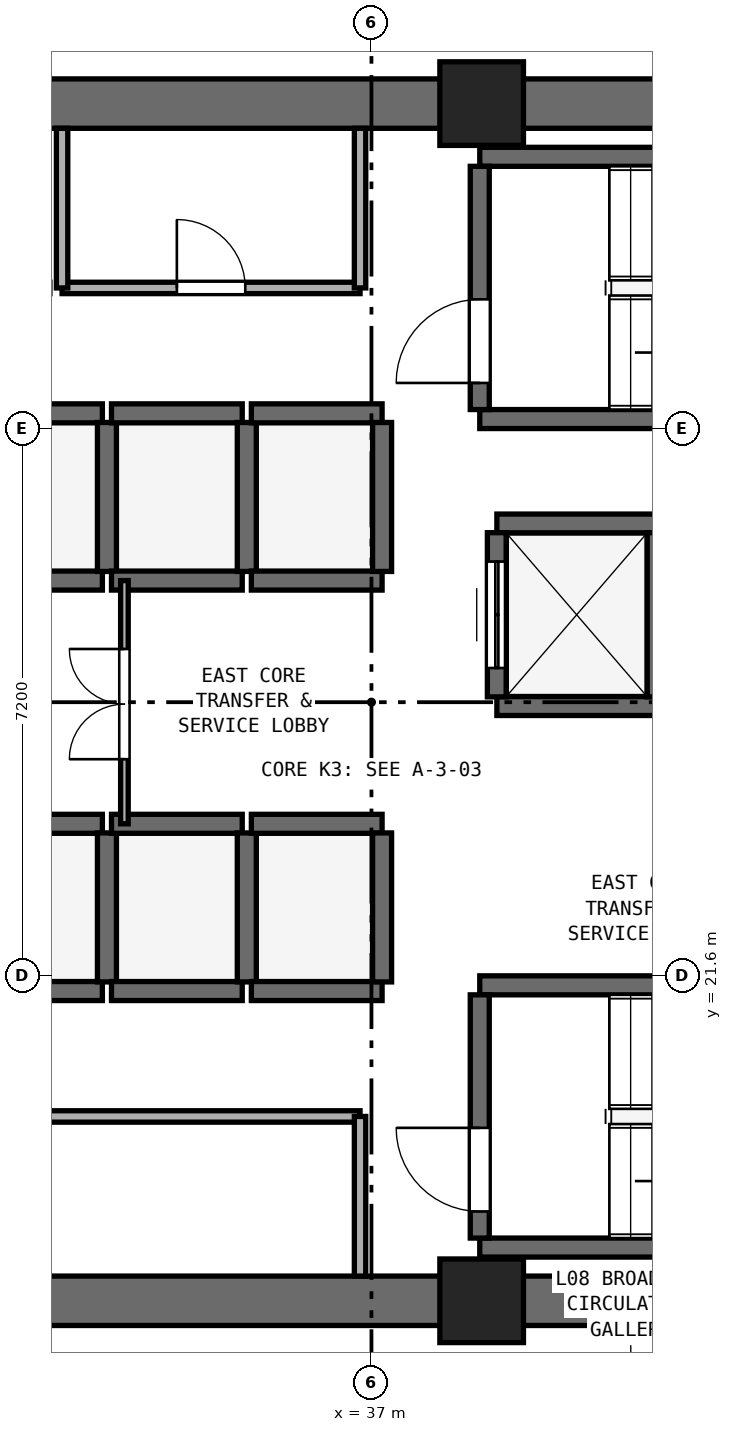
"""IFC4 building model, lengths in metres.
Left out: names, types, materials, properties, quantities, classifications, styles, units other than length and angle.
Written with IfcOpenShell. Run it as: python <this file> out.ifc"""

import sys

from ifc_helpers import new_model, si_unit, direction, frame, frame_2d, origin, origin_2d, place, context, subcontext, project, spatial, rectangle, extrude, element, fill, save


model = new_model("IFC4")
c1 = context("Model", 3, precision=1e-05, world=origin(), true_north=direction((0.0, 1.0)))
c2 = subcontext(c1, "Body", "Model", "MODEL_VIEW")
j1 = project(units=[si_unit("LENGTHUNIT", "METRE"), si_unit("PLANEANGLEUNIT", "RADIAN")], contexts=[c1])
p1 = place(None, origin())
s1 = spatial("IfcSite", under=j1, at=p1, CompositionType="ELEMENT")
p2 = place(p1, origin())
s2 = spatial("IfcBuilding", under=s1, at=p2, CompositionType="ELEMENT")
p3 = place(p2, frame((0.0, 0.0, 36.4)))
s3 = spatial("IfcBuildingStorey", under=s2, at=p3, CompositionType="ELEMENT", Elevation=36.4)
for number, where, z_axis, x_axis in (
    (1, (25.4, 17.325, 0.0), (0.0, 0.0, 1.0), (1.0, 0.0, 0.0)),
    (2, (25.4, 33.075, 0.0), (0.0, 0.0, 1.0), (1.0, 0.0, 0.0)),
):
    element("IfcWall", number, at=place(p3, frame(where, z_axis=z_axis, x_axis=x_axis)), inside=s3, PredefinedType="SHEAR", context=c2, shape_type="SweptSolid", body=[
        extrude(rectangle(XDim=23.2, YDim=0.65, at=frame_2d((11.6, 0.0))), origin(), (0.0, 0.0, 1.0), 3.525),
    ])
for number, where, z_axis, x_axis in (
    (3, (38.45, 17.325, 0.0), (0.0, 0.0, 1.0), (1.0, 0.0, 0.0)),
    (4, (38.45, 33.075, 0.0), (0.0, 0.0, 1.0), (1.0, 0.0, 0.0)),
):
    element("IfcColumn", number, at=place(p3, frame(where, z_axis=z_axis, x_axis=x_axis)), inside=s3, PredefinedType="PILASTER", context=c2, shape_type="SweptSolid", body=[
        extrude(rectangle(XDim=1.1, YDim=1.1, at=origin_2d()), origin(), (0.0, 0.0, 1.0), 3.8),
    ])
for number, where, z_axis, x_axis in (
    (5, (38.425, 28.925, 0.0), (0.0, 0.0, 1.0), (1.0, 0.0, 0.0)),
    (6, (38.425, 32.375, 0.0), (0.0, 0.0, 1.0), (1.0, 0.0, 0.0)),
):
    element("IfcWall", number, at=place(p3, frame(where, z_axis=z_axis, x_axis=x_axis)), inside=s3, PredefinedType="SHEAR", context=c2, shape_type="SweptSolid", body=[
        extrude(rectangle(XDim=7.3, YDim=0.25, at=frame_2d((3.65, 0.0))), origin(), (0.0, 0.0, 1.0), 3.525),
    ])
p4 = place(p3, frame((38.425, 29.05, 0.0), z_axis=(0.0, 0.0, 1.0), x_axis=(0.0, 1.0, 0.0)))
e7 = element("IfcWall", 7, at=p4, inside=s3, PredefinedType="SHEAR", context=c2, shape_type="SweptSolid", body=[
    extrude(rectangle(XDim=3.2, YDim=0.25, at=frame_2d((1.6, 0.0))), origin(), (0.0, 0.0, 1.0), 3.525),
])
p5 = place(p4, frame((0.35, 0.0, 0.0)))
e8 = element("IfcOpeningElement", 8, at=p5, cuts=e7, PredefinedType="OPENING", context=c2, shape_type="SweptSolid", body=[
    extrude(rectangle(XDim=1.1, YDim=2.15, at=frame_2d((0.55, 1.075))), frame((0.0, 0.135, 0.0), z_axis=(0.0, -1.0, 0.0), x_axis=(1.0, 0.0, 0.0)), (0.0, 0.0, 1.0), 0.27),
])
for number, where, z_axis, x_axis in (
    (9, (38.425, 18.025, 0.0), (0.0, 0.0, 1.0), (1.0, 0.0, 0.0)),
    (10, (38.425, 21.475, 0.0), (0.0, 0.0, 1.0), (1.0, 0.0, 0.0)),
):
    element("IfcWall", number, at=place(p3, frame(where, z_axis=z_axis, x_axis=x_axis)), inside=s3, PredefinedType="SHEAR", context=c2, shape_type="SweptSolid", body=[
        extrude(rectangle(XDim=7.3, YDim=0.25, at=frame_2d((3.65, 0.0))), origin(), (0.0, 0.0, 1.0), 3.525),
    ])
p6 = place(p3, frame((38.425, 18.15, 0.0), z_axis=(0.0, 0.0, 1.0), x_axis=(0.0, 1.0, 0.0)))
e11 = element("IfcWall", 11, at=p6, inside=s3, PredefinedType="SHEAR", context=c2, shape_type="SweptSolid", body=[
    extrude(rectangle(XDim=3.2, YDim=0.25, at=frame_2d((1.6, 0.0))), origin(), (0.0, 0.0, 1.0), 3.525),
])
p7 = place(p6, frame((0.35, 0.0, 0.0)))
e12 = element("IfcOpeningElement", 12, at=p7, cuts=e11, PredefinedType="OPENING", context=c2, shape_type="SweptSolid", body=[
    extrude(rectangle(XDim=1.1, YDim=2.15, at=frame_2d((0.55, 1.075))), frame((0.0, 0.135, 0.0), z_axis=(0.0, -1.0, 0.0), x_axis=(1.0, 0.0, 0.0)), (0.0, 0.0, 1.0), 0.27),
])
for number, where, z_axis, x_axis in (
    (13, (31.74, 21.4, 0.0), (0.0, 0.0, 1.0), (1.0, 0.0, 0.0)),
    (14, (31.74, 23.6, 0.0), (0.0, 0.0, 1.0), (1.0, 0.0, 0.0)),
):
    element("IfcWall", number, at=place(p3, frame(where, z_axis=z_axis, x_axis=x_axis)), inside=s3, PredefinedType="SHEAR", context=c2, shape_type="SweptSolid", body=[
        extrude(rectangle(XDim=1.72, YDim=0.25, at=frame_2d((0.86, 0.0))), origin(), (0.0, 0.0, 1.0), 3.525),
    ])
p8 = place(p3, frame((33.52, 21.52, 0.0), z_axis=(0.0, 0.0, 1.0), x_axis=(0.0, 1.0, 0.0)))
e15 = element("IfcWall", 15, at=p8, inside=s3, PredefinedType="SHEAR", context=c2, shape_type="SweptSolid", body=[
    extrude(rectangle(XDim=1.96, YDim=0.25, at=frame_2d((0.98, 0.0))), origin(), (0.0, 0.0, 1.0), 3.525),
])
for number, where, z_axis, x_axis in (
    (16, (33.58, 21.4, 0.0), (0.0, 0.0, 1.0), (1.0, 0.0, 0.0)),
    (17, (33.58, 23.6, 0.0), (0.0, 0.0, 1.0), (1.0, 0.0, 0.0)),
):
    element("IfcWall", number, at=place(p3, frame(where, z_axis=z_axis, x_axis=x_axis)), inside=s3, PredefinedType="SHEAR", context=c2, shape_type="SweptSolid", body=[
        extrude(rectangle(XDim=1.72, YDim=0.25, at=frame_2d((0.86, 0.0))), origin(), (0.0, 0.0, 1.0), 3.525),
    ])
p9 = place(p3, frame((35.36, 21.52, 0.0), z_axis=(0.0, 0.0, 1.0), x_axis=(0.0, 1.0, 0.0)))
e18 = element("IfcWall", 18, at=p9, inside=s3, PredefinedType="SHEAR", context=c2, shape_type="SweptSolid", body=[
    extrude(rectangle(XDim=1.96, YDim=0.25, at=frame_2d((0.98, 0.0))), origin(), (0.0, 0.0, 1.0), 3.525),
])
for number, where, z_axis, x_axis in (
    (19, (35.42, 21.4, 0.0), (0.0, 0.0, 1.0), (1.0, 0.0, 0.0)),
    (20, (35.42, 23.6, 0.0), (0.0, 0.0, 1.0), (1.0, 0.0, 0.0)),
):
    element("IfcWall", number, at=place(p3, frame(where, z_axis=z_axis, x_axis=x_axis)), inside=s3, PredefinedType="SHEAR", context=c2, shape_type="SweptSolid", body=[
        extrude(rectangle(XDim=1.72, YDim=0.25, at=frame_2d((0.86, 0.0))), origin(), (0.0, 0.0, 1.0), 3.525),
    ])
p10 = place(p3, frame((37.14, 21.52, 0.0), z_axis=(0.0, 0.0, 1.0), x_axis=(0.0, 1.0, 0.0)))
e21 = element("IfcWall", 21, at=p10, inside=s3, PredefinedType="SHEAR", context=c2, shape_type="SweptSolid", body=[
    extrude(rectangle(XDim=1.96, YDim=0.25, at=frame_2d((0.98, 0.0))), origin(), (0.0, 0.0, 1.0), 3.525),
])
for number, where, z_axis, x_axis in (
    (22, (31.74, 26.8, 0.0), (0.0, 0.0, 1.0), (1.0, 0.0, 0.0)),
    (23, (31.74, 29.0, 0.0), (0.0, 0.0, 1.0), (1.0, 0.0, 0.0)),
):
    element("IfcWall", number, at=place(p3, frame(where, z_axis=z_axis, x_axis=x_axis)), inside=s3, PredefinedType="SHEAR", context=c2, shape_type="SweptSolid", body=[
        extrude(rectangle(XDim=1.72, YDim=0.25, at=frame_2d((0.86, 0.0))), origin(), (0.0, 0.0, 1.0), 3.525),
    ])
p11 = place(p3, frame((33.52, 26.92, 0.0), z_axis=(0.0, 0.0, 1.0), x_axis=(0.0, 1.0, 0.0)))
e24 = element("IfcWall", 24, at=p11, inside=s3, PredefinedType="SHEAR", context=c2, shape_type="SweptSolid", body=[
    extrude(rectangle(XDim=1.96, YDim=0.25, at=frame_2d((0.98, 0.0))), origin(), (0.0, 0.0, 1.0), 3.525),
])
for number, where, z_axis, x_axis in (
    (25, (33.58, 26.8, 0.0), (0.0, 0.0, 1.0), (1.0, 0.0, 0.0)),
    (26, (33.58, 29.0, 0.0), (0.0, 0.0, 1.0), (1.0, 0.0, 0.0)),
):
    element("IfcWall", number, at=place(p3, frame(where, z_axis=z_axis, x_axis=x_axis)), inside=s3, PredefinedType="SHEAR", context=c2, shape_type="SweptSolid", body=[
        extrude(rectangle(XDim=1.72, YDim=0.25, at=frame_2d((0.86, 0.0))), origin(), (0.0, 0.0, 1.0), 3.525),
    ])
p12 = place(p3, frame((35.36, 26.92, 0.0), z_axis=(0.0, 0.0, 1.0), x_axis=(0.0, 1.0, 0.0)))
e27 = element("IfcWall", 27, at=p12, inside=s3, PredefinedType="SHEAR", context=c2, shape_type="SweptSolid", body=[
    extrude(rectangle(XDim=1.96, YDim=0.25, at=frame_2d((0.98, 0.0))), origin(), (0.0, 0.0, 1.0), 3.525),
])
for number, where, z_axis, x_axis in (
    (28, (35.42, 26.8, 0.0), (0.0, 0.0, 1.0), (1.0, 0.0, 0.0)),
    (29, (35.42, 29.0, 0.0), (0.0, 0.0, 1.0), (1.0, 0.0, 0.0)),
):
    element("IfcWall", number, at=place(p3, frame(where, z_axis=z_axis, x_axis=x_axis)), inside=s3, PredefinedType="SHEAR", context=c2, shape_type="SweptSolid", body=[
        extrude(rectangle(XDim=1.72, YDim=0.25, at=frame_2d((0.86, 0.0))), origin(), (0.0, 0.0, 1.0), 3.525),
    ])
p13 = place(p3, frame((37.14, 26.92, 0.0), z_axis=(0.0, 0.0, 1.0), x_axis=(0.0, 1.0, 0.0)))
e30 = element("IfcWall", 30, at=p13, inside=s3, PredefinedType="SHEAR", context=c2, shape_type="SweptSolid", body=[
    extrude(rectangle(XDim=1.96, YDim=0.25, at=frame_2d((0.98, 0.0))), origin(), (0.0, 0.0, 1.0), 3.525),
])
for number, where, z_axis, x_axis in (
    (31, (38.65, 25.15, 0.0), (0.0, 0.0, 1.0), (1.0, 0.0, 0.0)),
    (32, (38.65, 27.55, 0.0), (0.0, 0.0, 1.0), (1.0, 0.0, 0.0)),
):
    element("IfcWall", number, at=place(p3, frame(where, z_axis=z_axis, x_axis=x_axis)), inside=s3, PredefinedType="SHEAR", context=c2, shape_type="SweptSolid", body=[
        extrude(rectangle(XDim=2.1, YDim=0.25, at=frame_2d((1.05, 0.0))), origin(), (0.0, 0.0, 1.0), 3.525),
    ])
p14 = place(p3, frame((38.65, 25.27, 0.0), z_axis=(0.0, 0.0, 1.0), x_axis=(0.0, 1.0, 0.0)))
e33 = element("IfcWall", 33, at=p14, inside=s3, PredefinedType="SHEAR", context=c2, shape_type="SweptSolid", body=[
    extrude(rectangle(XDim=2.16, YDim=0.25, at=frame_2d((1.08, 0.0))), origin(), (0.0, 0.0, 1.0), 3.525),
])
p15 = place(p14, frame((0.38, 0.0, 0.0)))
e34 = element("IfcOpeningElement", 34, at=p15, cuts=e33, PredefinedType="OPENING", context=c2, shape_type="SweptSolid", body=[
    extrude(rectangle(XDim=1.4, YDim=2.2, at=frame_2d((0.7, 1.1))), frame((0.0, 0.135, 0.0), z_axis=(0.0, -1.0, 0.0), x_axis=(1.0, 0.0, 0.0)), (0.0, 0.0, 1.0), 0.27),
])
p16 = place(p3, frame((40.75, 25.27, 0.0), z_axis=(0.0, 0.0, 1.0), x_axis=(0.0, 1.0, 0.0)))
e35 = element("IfcWall", 35, at=p16, inside=s3, PredefinedType="SHEAR", context=c2, shape_type="SweptSolid", body=[
    extrude(rectangle(XDim=2.16, YDim=0.25, at=frame_2d((1.08, 0.0))), origin(), (0.0, 0.0, 1.0), 3.525),
])
p17 = place(p3, frame((32.93, 30.65, 0.0), z_axis=(0.0, 0.0, 1.0), x_axis=(1.0, 0.0, 0.0)))
e36 = element("IfcWall", 36, at=p17, inside=s3, PredefinedType="PARTITIONING", context=c2, shape_type="SweptSolid", body=[
    extrude(rectangle(XDim=3.92, YDim=0.15, at=frame_2d((1.96, 0.0))), origin(), (0.0, 0.0, 1.0), 3.525),
])
p18 = place(p17, frame((1.51, 0.0, 0.0)))
e37 = element("IfcOpeningElement", 37, at=p18, cuts=e36, PredefinedType="OPENING", context=c2, shape_type="SweptSolid", body=[
    extrude(rectangle(XDim=0.9, YDim=2.1, at=frame_2d((0.45, 1.05))), frame((0.0, 0.085, 0.0), z_axis=(0.0, -1.0, 0.0), x_axis=(1.0, 0.0, 0.0)), (0.0, 0.0, 1.0), 0.17),
])
for number, where, z_axis, x_axis in (
    (38, (32.93, 30.65, 0.0), (0.0, 0.0, 1.0), (0.0, 1.0, 0.0)),
    (39, (36.85, 30.65, 0.0), (0.0, 0.0, 1.0), (0.0, 1.0, 0.0)),
):
    element("IfcWall", number, at=place(p3, frame(where, z_axis=z_axis, x_axis=x_axis)), inside=s3, PredefinedType="PARTITIONING", context=c2, shape_type="SweptSolid", body=[
        extrude(rectangle(XDim=2.1, YDim=0.15, at=frame_2d((1.05, 0.0))), origin(), (0.0, 0.0, 1.0), 3.525),
    ])
p19 = place(p3, frame((26.17, 19.75, 0.0), z_axis=(0.0, 0.0, 1.0), x_axis=(1.0, 0.0, 0.0)))
e40 = element("IfcWall", 40, at=p19, inside=s3, PredefinedType="PARTITIONING", context=c2, shape_type="SweptSolid", body=[
    extrude(rectangle(XDim=10.68, YDim=0.15, at=frame_2d((5.34, 0.0))), origin(), (0.0, 0.0, 1.0), 3.525),
])
p20 = place(p19, frame((4.865, 0.0, 0.0)))
e41 = element("IfcOpeningElement", 41, at=p20, cuts=e40, PredefinedType="OPENING", context=c2, shape_type="SweptSolid", body=[
    extrude(rectangle(XDim=0.95, YDim=2.1, at=frame_2d((0.475, 1.05))), frame((0.0, 0.085, 0.0), z_axis=(0.0, -1.0, 0.0), x_axis=(1.0, 0.0, 0.0)), (0.0, 0.0, 1.0), 0.17),
])
p21 = place(p3, frame((36.85, 17.65, 0.0), z_axis=(0.0, 0.0, 1.0), x_axis=(0.0, 1.0, 0.0)))
e42 = element("IfcWall", 42, at=p21, inside=s3, PredefinedType="PARTITIONING", context=c2, shape_type="SweptSolid", body=[
    extrude(rectangle(XDim=2.1, YDim=0.15, at=frame_2d((1.05, 0.0))), origin(), (0.0, 0.0, 1.0), 3.525),
])
p22 = place(p3, frame((33.75, 23.6, 0.0), z_axis=(0.0, 0.0, 1.0), x_axis=(0.0, 1.0, 0.0)))
e43 = element("IfcWall", 43, at=p22, inside=s3, PredefinedType="PARTITIONING", context=c2, shape_type="SweptSolid", body=[
    extrude(rectangle(XDim=3.2, YDim=0.1, at=frame_2d((1.6, 0.0))), origin(), (0.0, 0.0, 1.0), 3.525),
])
p23 = place(p22, frame((0.85, 0.0, 0.0)))
e44 = element("IfcOpeningElement", 44, at=p23, cuts=e43, PredefinedType="OPENING", context=c2, shape_type="SweptSolid", body=[
    extrude(rectangle(XDim=1.45, YDim=2.12, at=frame_2d((0.725, 1.06))), frame((0.0, 0.06, 0.0), z_axis=(0.0, -1.0, 0.0), x_axis=(1.0, 0.0, 0.0)), (0.0, 0.0, 1.0), 0.12),
])
p24 = place(p5, origin())
e45 = element("IfcDoor", 45, at=p24, inside=s3, OperationType="SINGLE_SWING_LEFT", PredefinedType="DOOR", context=c2, shape_type="SweptSolid", body=[
    extrude(rectangle(XDim=1.1, YDim=2.15, at=frame_2d((0.55, 1.075))), frame((0.0, 0.025, 0.0), z_axis=(0.0, -1.0, 0.0), x_axis=(1.0, 0.0, 0.0)), (0.0, 0.0, 1.0), 0.05),
])
fill(e8, e45)
p25 = place(p7, origin())
e46 = element("IfcDoor", 46, at=p25, inside=s3, OperationType="SINGLE_SWING_RIGHT", PredefinedType="DOOR", context=c2, shape_type="SweptSolid", body=[
    extrude(rectangle(XDim=1.1, YDim=2.15, at=frame_2d((0.55, 1.075))), frame((0.0, 0.025, 0.0), z_axis=(0.0, -1.0, 0.0), x_axis=(1.0, 0.0, 0.0)), (0.0, 0.0, 1.0), 0.05),
])
fill(e12, e46)
p26 = place(p15, origin())
e47 = element("IfcDoor", 47, at=p26, inside=s3, OperationType="DOUBLE_DOOR_SLIDING", PredefinedType="DOOR", context=c2, shape_type="SweptSolid", body=[
    extrude(rectangle(XDim=1.4, YDim=2.2, at=frame_2d((0.7, 1.1))), frame((0.0, 0.025, 0.0), z_axis=(0.0, -1.0, 0.0), x_axis=(1.0, 0.0, 0.0)), (0.0, 0.0, 1.0), 0.05),
])
fill(e34, e47)
p27 = place(p18, origin())
e48 = element("IfcDoor", 48, at=p27, inside=s3, OperationType="SINGLE_SWING_LEFT", PredefinedType="DOOR", context=c2, shape_type="SweptSolid", body=[
    extrude(rectangle(XDim=0.9, YDim=2.1, at=frame_2d((0.45, 1.05))), frame((0.0, 0.025, 0.0), z_axis=(0.0, -1.0, 0.0), x_axis=(1.0, 0.0, 0.0)), (0.0, 0.0, 1.0), 0.05),
])
fill(e37, e48)
p28 = place(p23, origin())
e49 = element("IfcDoor", 49, at=p28, inside=s3, OperationType="DOUBLE_DOOR_SINGLE_SWING", PredefinedType="DOOR", context=c2, shape_type="SweptSolid", body=[
    extrude(rectangle(XDim=1.45, YDim=2.12, at=frame_2d((0.725, 1.06))), frame((0.0, 0.025, 0.0), z_axis=(0.0, -1.0, 0.0), x_axis=(1.0, 0.0, 0.0)), (0.0, 0.0, 1.0), 0.05),
])
fill(e44, e49)
save(model, sys.argv[1])
